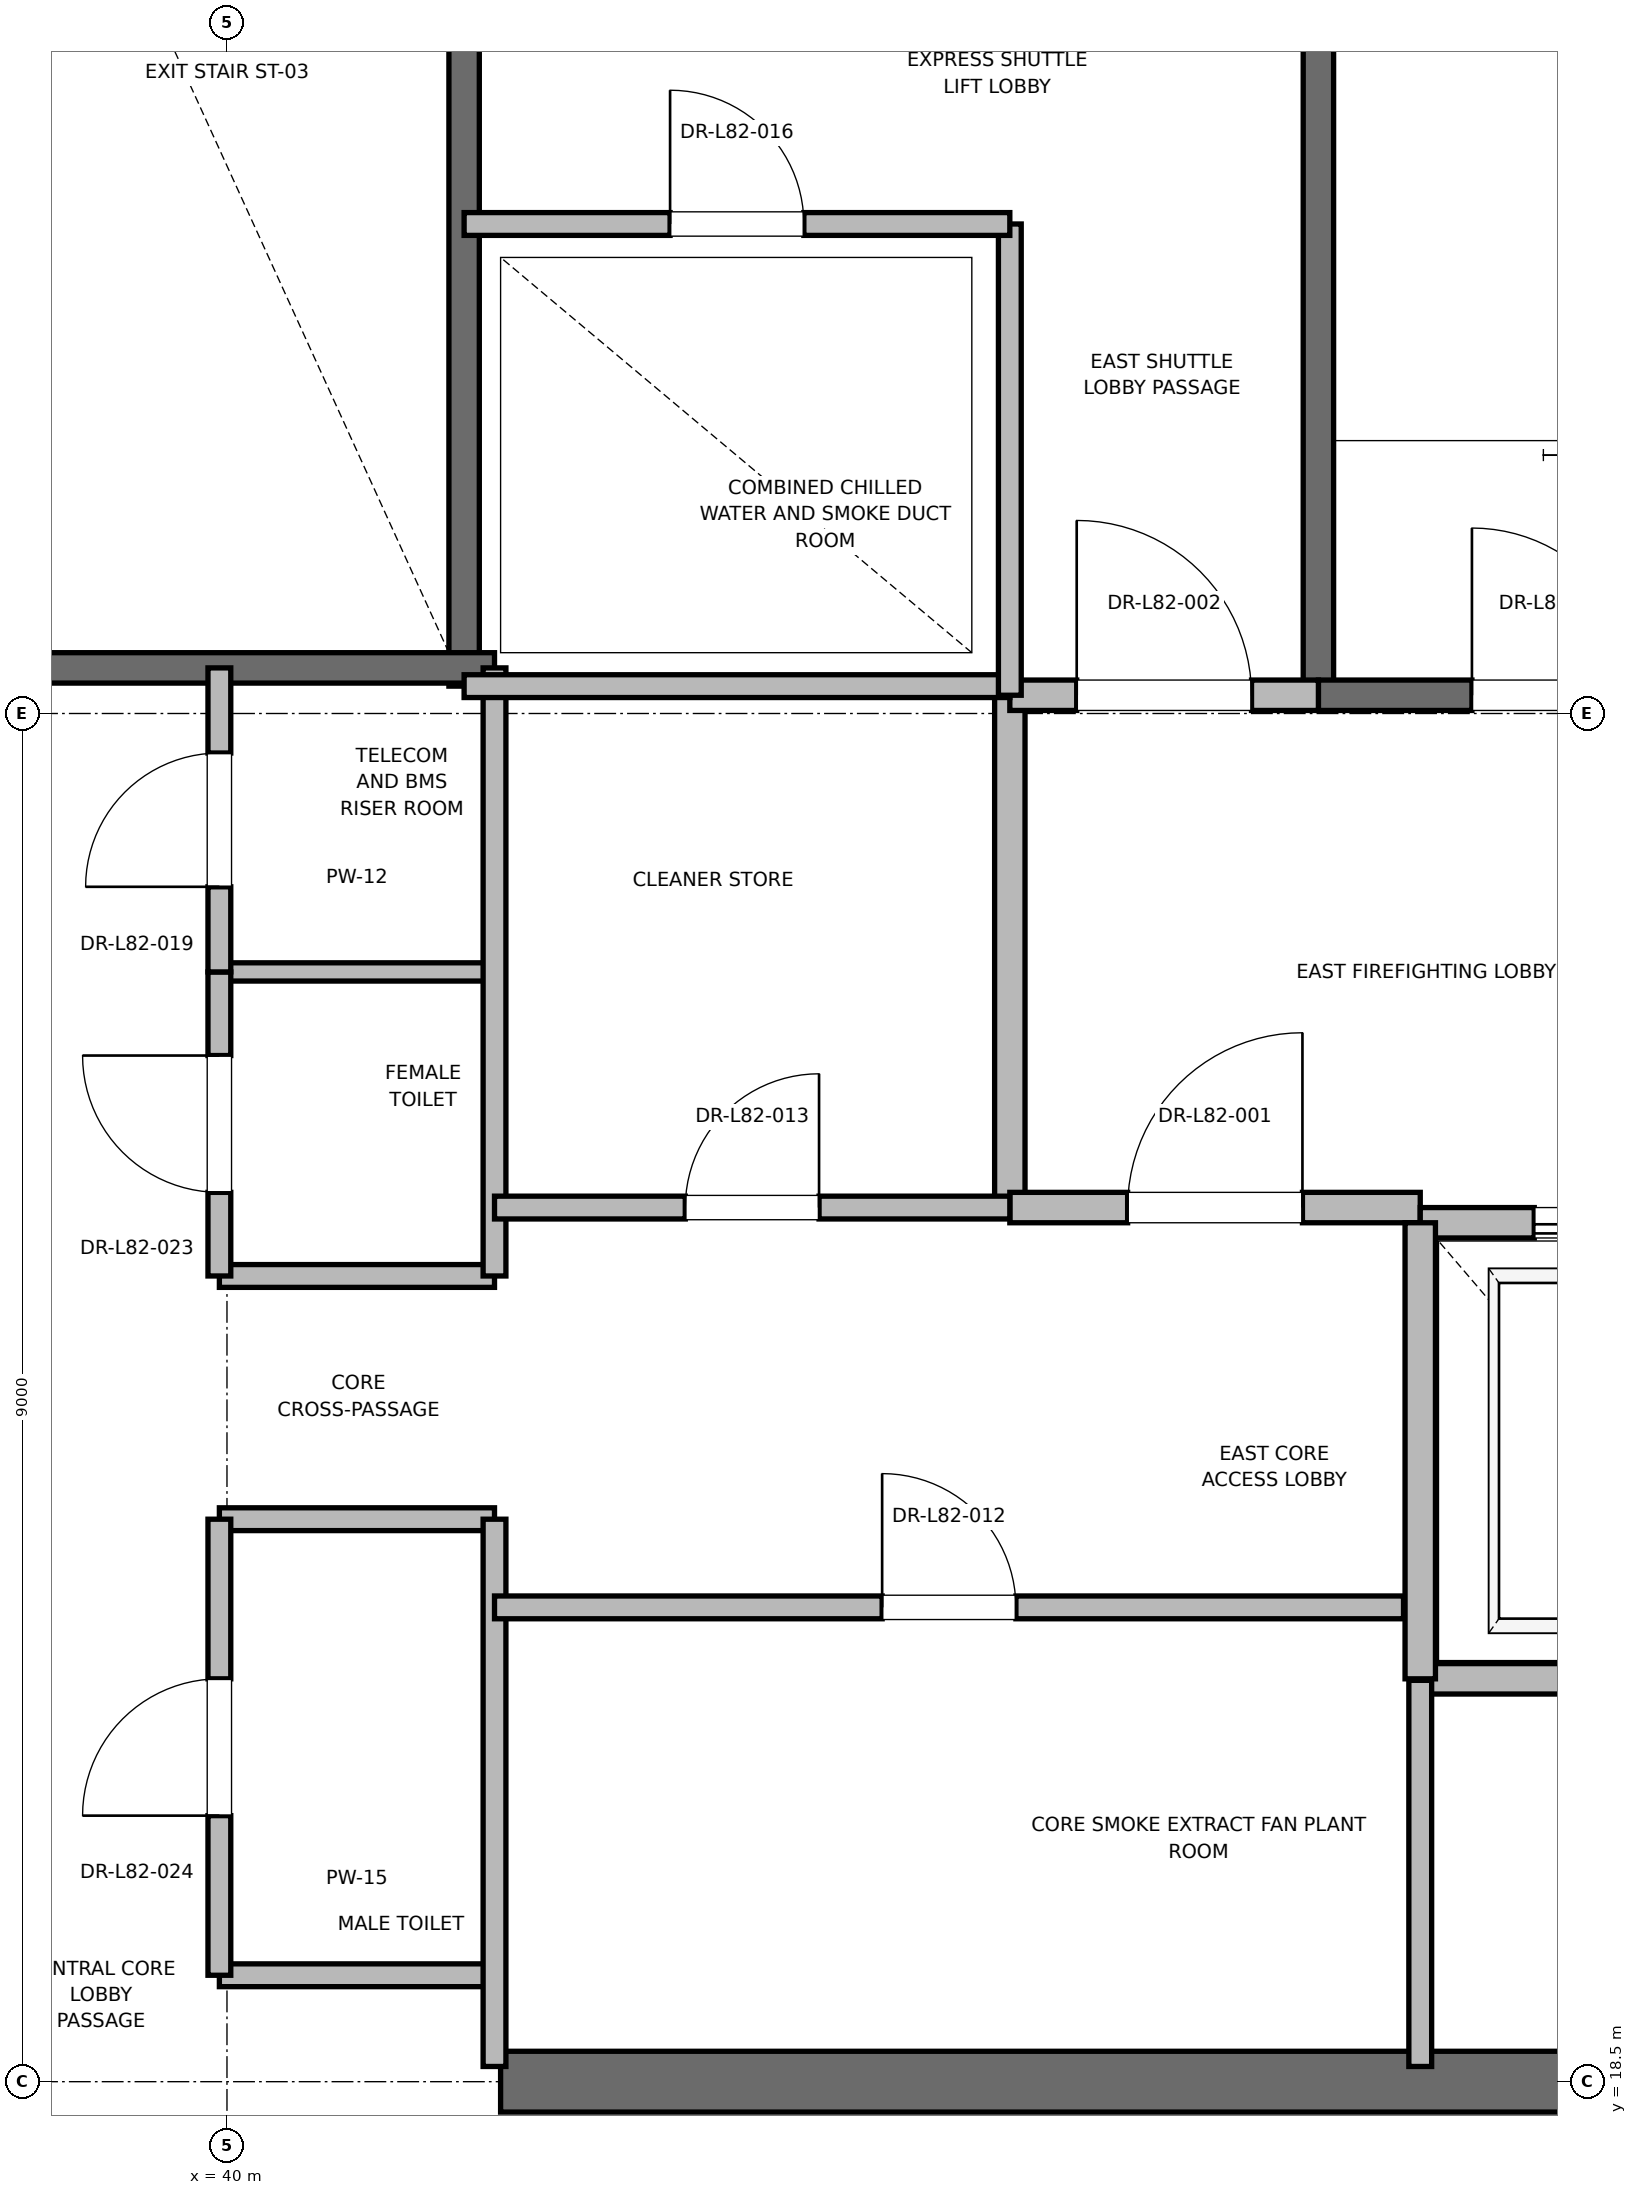
"""IFC4 building model, lengths in metres.
Left out: names, types, materials, properties, quantities, classifications, styles, units other than length and angle.
Written with IfcOpenShell. Run it as: python <this file> out.ifc"""

import sys

from ifc_helpers import new_model, si_unit, direction, frame, frame_2d, origin, place, context, subcontext, project, spatial, rectangle, extrude, element, fill, save


model = new_model("IFC4")
c1 = context("Model", 3, precision=1e-05, world=origin(), true_north=direction((0.0, 1.0)))
c2 = subcontext(c1, "Body", "Model", "MODEL_VIEW")
j1 = project(units=[si_unit("LENGTHUNIT", "METRE"), si_unit("PLANEANGLEUNIT", "RADIAN")], contexts=[c1])
p1 = place(None, origin())
s1 = spatial("IfcSite", under=j1, at=p1, CompositionType="ELEMENT")
p2 = place(p1, origin())
s2 = spatial("IfcBuilding", under=s1, at=p2, CompositionType="ELEMENT")
p3 = place(p2, frame((0.0, 0.0, 354.3)))
s3 = spatial("IfcBuildingStorey", under=s2, at=p3, CompositionType="ELEMENT", Elevation=354.3)
p4 = place(p3, frame((41.8, 18.5, 0.0), z_axis=(0.0, 0.0, 1.0), x_axis=(1.0, 0.0, 0.0)))
e1 = element("IfcWall", 1, at=p4, inside=s3, PredefinedType="SHEAR", context=c2, shape_type="SweptSolid", body=[
    extrude(rectangle(XDim=9.2, YDim=0.4, at=frame_2d((4.6, 0.0))), origin(), (0.0, 0.0, 1.0), 5.24),
])
p5 = place(p3, frame((47.18, 27.62, 0.0), z_axis=(0.0, 0.0, 1.0), x_axis=(0.0, 1.0, 0.0)))
e2 = element("IfcWall", 2, at=p5, inside=s3, PredefinedType="SOLIDWALL", context=c2, shape_type="SweptSolid", body=[
    extrude(rectangle(XDim=8.18, YDim=0.2, at=frame_2d((4.09, 0.0))), origin(), (0.0, 0.0, 1.0), 5.24),
])
p6 = place(p3, frame((47.18, 27.62, 0.0), z_axis=(0.0, 0.0, 1.0), x_axis=(1.0, 0.0, 0.0)))
e3 = element("IfcWall", 3, at=p6, inside=s3, PredefinedType="SOLIDWALL", context=c2, shape_type="SweptSolid", body=[
    extrude(rectangle(XDim=3.12, YDim=0.2, at=frame_2d((1.56, 0.0))), origin(), (0.0, 0.0, 1.0), 5.24),
])
p7 = place(p6, frame((1.01, 0.0, 0.0)))
e4 = element("IfcOpeningElement", 4, at=p7, cuts=e3, PredefinedType="OPENING", context=c2, shape_type="SweptSolid", body=[
    extrude(rectangle(XDim=1.1, YDim=2.15, at=frame_2d((0.55, 1.075))), frame((0.0, 0.1, 0.0), z_axis=(0.0, -1.0, 0.0), x_axis=(1.0, 0.0, 0.0)), (0.0, 0.0, 1.0), 0.2),
])
p8 = place(p3, frame((41.56, 27.68, 0.0), z_axis=(0.0, 0.0, 1.0), x_axis=(0.0, 1.0, 0.0)))
e5 = element("IfcWall", 5, at=p8, inside=s3, PredefinedType="SOLIDWALL", context=c2, shape_type="SweptSolid", body=[
    extrude(rectangle(XDim=8.57, YDim=0.2, at=frame_2d((4.285, 0.0))), origin(), (0.0, 0.0, 1.0), 5.24),
])
p9 = place(p3, frame((38.44, 27.8, 0.0), z_axis=(0.0, 0.0, 1.0), x_axis=(1.0, 0.0, 0.0)))
e6 = element("IfcWall", 6, at=p9, inside=s3, PredefinedType="SOLIDWALL", context=c2, shape_type="SweptSolid", body=[
    extrude(rectangle(XDim=3.32, YDim=0.2, at=frame_2d((1.66, 0.0))), origin(), (0.0, 0.0, 1.0), 5.24),
])
p10 = place(p3, frame((45.15, 24.25, 0.0), z_axis=(0.0, 0.0, 1.0), x_axis=(0.0, 1.0, 0.0)))
e7 = element("IfcWall", 7, at=p10, inside=s3, PredefinedType="PARTITIONING", context=c2, shape_type="SweptSolid", body=[
    extrude(rectangle(XDim=3.37, YDim=0.2, at=frame_2d((1.685, 0.0))), origin(), (0.0, 0.0, 1.0), 5.24),
])
p11 = place(p3, frame((45.15, 24.25, 0.0), z_axis=(0.0, 0.0, 1.0), x_axis=(1.0, 0.0, 0.0)))
e8 = element("IfcWall", 8, at=p11, inside=s3, PredefinedType="PARTITIONING", context=c2, shape_type="SweptSolid", body=[
    extrude(rectangle(XDim=2.7, YDim=0.2, at=frame_2d((1.35, 0.0))), origin(), (0.0, 0.0, 1.0), 5.24),
])
p12 = place(p11, frame((0.775, 0.0, 0.0)))
e9 = element("IfcOpeningElement", 9, at=p12, cuts=e8, PredefinedType="OPENING", context=c2, shape_type="SweptSolid", body=[
    extrude(rectangle(XDim=1.15, YDim=2.2, at=frame_2d((0.575, 1.1))), frame((0.0, 0.1, 0.0), z_axis=(0.0, -1.0, 0.0), x_axis=(1.0, 0.0, 0.0)), (0.0, 0.0, 1.0), 0.2),
])
p13 = place(p3, frame((45.15, 27.62, 0.0), z_axis=(0.0, 0.0, 1.0), x_axis=(1.0, 0.0, 0.0)))
e10 = element("IfcWall", 10, at=p13, inside=s3, PredefinedType="PARTITIONING", context=c2, shape_type="SweptSolid", body=[
    extrude(rectangle(XDim=2.03, YDim=0.2, at=frame_2d((1.015, 0.0))), origin(), (0.0, 0.0, 1.0), 5.24),
])
p14 = place(p13, frame((0.44, 0.0, 0.0)))
e11 = element("IfcOpeningElement", 11, at=p14, cuts=e10, PredefinedType="OPENING", context=c2, shape_type="SweptSolid", body=[
    extrude(rectangle(XDim=1.15, YDim=2.2, at=frame_2d((0.575, 1.1))), frame((0.0, 0.1, 0.0), z_axis=(0.0, -1.0, 0.0), x_axis=(1.0, 0.0, 0.0)), (0.0, 0.0, 1.0), 0.2),
])
p15 = place(p3, frame((47.85, 21.15, 0.0), z_axis=(0.0, 0.0, 1.0), x_axis=(1.0, 0.0, 0.0)))
e12 = element("IfcWall", 12, at=p15, inside=s3, PredefinedType="SOLIDWALL", context=c2, shape_type="SweptSolid", body=[
    extrude(rectangle(XDim=2.6, YDim=0.2, at=frame_2d((1.3, 0.0))), origin(), (0.0, 0.0, 1.0), 5.24),
])
p16 = place(p3, frame((50.45, 24.15, 0.0), z_axis=(0.0, 0.0, 1.0), x_axis=(-1.0, 0.0, 0.0)))
e13 = element("IfcWall", 13, at=p16, inside=s3, PredefinedType="SOLIDWALL", context=c2, shape_type="SweptSolid", body=[
    extrude(rectangle(XDim=2.6, YDim=0.2, at=frame_2d((1.3, 0.0))), origin(), (0.0, 0.0, 1.0), 4.32),
])
p17 = place(p16, frame((0.75, 0.0, 0.0)))
e14 = element("IfcOpeningElement", 14, at=p17, cuts=e13, PredefinedType="OPENING", context=c2, shape_type="SweptSolid", body=[
    extrude(rectangle(XDim=1.1, YDim=2.2, at=frame_2d((0.55, 1.1))), frame((0.0, 0.1, 0.0), z_axis=(0.0, -1.0, 0.0), x_axis=(1.0, 0.0, 0.0)), (0.0, 0.0, 1.0), 0.2),
])
p18 = place(p3, frame((47.85, 24.15, 0.0), z_axis=(0.0, 0.0, 1.0), x_axis=(0.0, -1.0, 0.0)))
e15 = element("IfcWall", 15, at=p18, inside=s3, PredefinedType="SOLIDWALL", context=c2, shape_type="SweptSolid", body=[
    extrude(rectangle(XDim=3.0, YDim=0.2, at=frame_2d((1.5, 0.0))), origin(), (0.0, 0.0, 1.0), 5.24),
])
for number, where, z_axis, x_axis in (
    (16, (39.95, 19.2, 0.0), (0.0, 0.0, 1.0), (1.0, 0.0, 0.0)),
    (17, (39.95, 22.2, 0.0), (0.0, 0.0, 1.0), (1.0, 0.0, 0.0)),
    (18, (39.95, 23.8, 0.0), (0.0, 0.0, 1.0), (1.0, 0.0, 0.0)),
):
    element("IfcWall", number, at=place(p3, frame(where, z_axis=z_axis, x_axis=x_axis)), inside=s3, PredefinedType="PARTITIONING", context=c2, shape_type="SweptSolid", body=[
        extrude(rectangle(XDim=1.81, YDim=0.15, at=frame_2d((0.905, 0.0))), origin(), (0.0, 0.0, 1.0), 2.85),
    ])
p19 = place(p3, frame((39.95, 25.8, 0.0), z_axis=(0.0, 0.0, 1.0), x_axis=(1.0, 0.0, 0.0)))
e19 = element("IfcWall", 19, at=p19, inside=s3, PredefinedType="PARTITIONING", context=c2, shape_type="SweptSolid", body=[
    extrude(rectangle(XDim=1.81, YDim=0.12, at=frame_2d((0.905, 0.0))), origin(), (0.0, 0.0, 1.0), 2.85),
])
p20 = place(p3, frame((41.76, 18.6, 0.0), z_axis=(0.0, 0.0, 1.0), x_axis=(0.0, 1.0, 0.0)))
e20 = element("IfcWall", 20, at=p20, inside=s3, PredefinedType="PARTITIONING", context=c2, shape_type="SweptSolid", body=[
    extrude(rectangle(XDim=3.6, YDim=0.15, at=frame_2d((1.8, 0.0))), origin(), (0.0, 0.0, 1.0), 2.85),
])
p21 = place(p3, frame((41.76, 23.8, 0.0), z_axis=(0.0, 0.0, 1.0), x_axis=(0.0, 1.0, 0.0)))
e21 = element("IfcWall", 21, at=p21, inside=s3, PredefinedType="PARTITIONING", context=c2, shape_type="SweptSolid", body=[
    extrude(rectangle(XDim=4.0, YDim=0.15, at=frame_2d((2.0, 0.0))), origin(), (0.0, 0.0, 1.0), 2.85),
])
p22 = place(p3, frame((39.95, 19.2, 0.0), z_axis=(0.0, 0.0, 1.0), x_axis=(0.0, 1.0, 0.0)))
e22 = element("IfcWall", 22, at=p22, inside=s3, PredefinedType="PARTITIONING", context=c2, shape_type="SweptSolid", body=[
    extrude(rectangle(XDim=3.0, YDim=0.15, at=frame_2d((1.5, 0.0))), origin(), (0.0, 0.0, 1.0), 2.85),
])
p23 = place(p22, frame((1.05, 0.0, 0.0)))
e23 = element("IfcOpeningElement", 23, at=p23, cuts=e22, PredefinedType="OPENING", context=c2, shape_type="SweptSolid", body=[
    extrude(rectangle(XDim=0.9, YDim=2.1, at=frame_2d((0.45, 1.05))), frame((0.0, 0.075, 0.0), z_axis=(0.0, -1.0, 0.0), x_axis=(1.0, 0.0, 0.0)), (0.0, 0.0, 1.0), 0.15),
])
p24 = place(p3, frame((39.95, 23.8, 0.0), z_axis=(0.0, 0.0, 1.0), x_axis=(0.0, 1.0, 0.0)))
e24 = element("IfcWall", 24, at=p24, inside=s3, PredefinedType="PARTITIONING", context=c2, shape_type="SweptSolid", body=[
    extrude(rectangle(XDim=2.0, YDim=0.15, at=frame_2d((1.0, 0.0))), origin(), (0.0, 0.0, 1.0), 2.85),
])
p25 = place(p24, frame((0.55, 0.0, 0.0)))
e25 = element("IfcOpeningElement", 25, at=p25, cuts=e24, PredefinedType="OPENING", context=c2, shape_type="SweptSolid", body=[
    extrude(rectangle(XDim=0.9, YDim=2.1, at=frame_2d((0.45, 1.05))), frame((0.0, 0.075, 0.0), z_axis=(0.0, -1.0, 0.0), x_axis=(1.0, 0.0, 0.0)), (0.0, 0.0, 1.0), 0.15),
])
p26 = place(p3, frame((39.95, 25.8, 0.0), z_axis=(0.0, 0.0, 1.0), x_axis=(0.0, 1.0, 0.0)))
e26 = element("IfcWall", 26, at=p26, inside=s3, PredefinedType="PARTITIONING", context=c2, shape_type="SweptSolid", body=[
    extrude(rectangle(XDim=2.0, YDim=0.15, at=frame_2d((1.0, 0.0))), origin(), (0.0, 0.0, 1.0), 2.85),
])
p27 = place(p26, frame((0.56, 0.0, 0.0)))
e27 = element("IfcOpeningElement", 27, at=p27, cuts=e26, PredefinedType="OPENING", context=c2, shape_type="SweptSolid", body=[
    extrude(rectangle(XDim=0.88, YDim=2.1, at=frame_2d((0.44, 1.05))), frame((0.0, 0.075, 0.0), z_axis=(0.0, -1.0, 0.0), x_axis=(1.0, 0.0, 0.0)), (0.0, 0.0, 1.0), 0.15),
])
p28 = place(p3, frame((41.56, 27.68, 0.0), z_axis=(0.0, 0.0, 1.0), x_axis=(1.0, 0.0, 0.0)))
e28 = element("IfcWall", 28, at=p28, inside=s3, PredefinedType="PARTITIONING", context=c2, shape_type="SweptSolid", body=[
    extrude(rectangle(XDim=3.59, YDim=0.15, at=frame_2d((1.795, 0.0))), origin(), (0.0, 0.0, 1.0), 2.85),
])
p29 = place(p3, frame((47.85, 18.6, 0.0), z_axis=(0.0, 0.0, 1.0), x_axis=(0.0, 1.0, 0.0)))
e29 = element("IfcWall", 29, at=p29, inside=s3, PredefinedType="PARTITIONING", context=c2, shape_type="SweptSolid", body=[
    extrude(rectangle(XDim=2.54, YDim=0.15, at=frame_2d((1.27, 0.0))), origin(), (0.0, 0.0, 1.0), 2.85),
])
p30 = place(p3, frame((41.76, 21.62, 0.0), z_axis=(0.0, 0.0, 1.0), x_axis=(1.0, 0.0, 0.0)))
e30 = element("IfcWall", 30, at=p30, inside=s3, PredefinedType="PARTITIONING", context=c2, shape_type="SweptSolid", body=[
    extrude(rectangle(XDim=5.98, YDim=0.15, at=frame_2d((2.99, 0.0))), origin(), (0.0, 0.0, 1.0), 2.85),
])
p31 = place(p30, frame((2.55, 0.0, 0.0)))
e31 = element("IfcOpeningElement", 31, at=p31, cuts=e30, PredefinedType="OPENING", context=c2, shape_type="SweptSolid", body=[
    extrude(rectangle(XDim=0.88, YDim=2.1, at=frame_2d((0.44, 1.05))), frame((0.0, 0.075, 0.0), z_axis=(0.0, -1.0, 0.0), x_axis=(1.0, 0.0, 0.0)), (0.0, 0.0, 1.0), 0.15),
])
p32 = place(p3, frame((41.76, 24.25, 0.0), z_axis=(0.0, 0.0, 1.0), x_axis=(1.0, 0.0, 0.0)))
e32 = element("IfcWall", 32, at=p32, inside=s3, PredefinedType="PARTITIONING", context=c2, shape_type="SweptSolid", body=[
    extrude(rectangle(XDim=3.39, YDim=0.15, at=frame_2d((1.695, 0.0))), origin(), (0.0, 0.0, 1.0), 2.85),
])
p33 = place(p32, frame((1.255, 0.0, 0.0)))
e33 = element("IfcOpeningElement", 33, at=p33, cuts=e32, PredefinedType="OPENING", context=c2, shape_type="SweptSolid", body=[
    extrude(rectangle(XDim=0.88, YDim=2.1, at=frame_2d((0.44, 1.05))), frame((0.0, 0.075, 0.0), z_axis=(0.0, -1.0, 0.0), x_axis=(1.0, 0.0, 0.0)), (0.0, 0.0, 1.0), 0.15),
])
p34 = place(p3, frame((45.15, 27.62, 0.0), z_axis=(0.0, 0.0, 1.0), x_axis=(0.0, 1.0, 0.0)))
e34 = element("IfcWall", 34, at=p34, inside=s3, PredefinedType="PARTITIONING", context=c2, shape_type="SweptSolid", body=[
    extrude(rectangle(XDim=3.1, YDim=0.15, at=frame_2d((1.55, 0.0))), origin(), (0.0, 0.0, 1.0), 2.85),
])
p35 = place(p3, frame((41.56, 30.72, 0.0), z_axis=(0.0, 0.0, 1.0), x_axis=(1.0, 0.0, 0.0)))
e35 = element("IfcWall", 35, at=p35, inside=s3, PredefinedType="PARTITIONING", context=c2, shape_type="SweptSolid", body=[
    extrude(rectangle(XDim=3.59, YDim=0.15, at=frame_2d((1.795, 0.0))), origin(), (0.0, 0.0, 1.0), 2.85),
])
p36 = place(p35, frame((1.355, 0.0, 0.0)))
e36 = element("IfcOpeningElement", 36, at=p36, cuts=e35, PredefinedType="OPENING", context=c2, shape_type="SweptSolid", body=[
    extrude(rectangle(XDim=0.88, YDim=2.1, at=frame_2d((0.44, 1.05))), frame((0.0, 0.075, 0.0), z_axis=(0.0, -1.0, 0.0), x_axis=(1.0, 0.0, 0.0)), (0.0, 0.0, 1.0), 0.15),
])
p37 = place(p7, origin())
e37 = element("IfcDoor", 37, at=p37, inside=s3, OperationType="SINGLE_SWING_LEFT", PredefinedType="DOOR", context=c2, shape_type="SweptSolid", body=[
    extrude(rectangle(XDim=1.1, YDim=2.15, at=frame_2d((0.55, 1.075))), frame((0.0, 0.025, 0.0), z_axis=(0.0, -1.0, 0.0), x_axis=(1.0, 0.0, 0.0)), (0.0, 0.0, 1.0), 0.05),
])
fill(e4, e37)
p38 = place(p12, origin())
e38 = element("IfcDoor", 38, at=p38, inside=s3, OperationType="SINGLE_SWING_RIGHT", PredefinedType="DOOR", context=c2, shape_type="SweptSolid", body=[
    extrude(rectangle(XDim=1.15, YDim=2.2, at=frame_2d((0.575, 1.1))), frame((0.0, 0.025, 0.0), z_axis=(0.0, -1.0, 0.0), x_axis=(1.0, 0.0, 0.0)), (0.0, 0.0, 1.0), 0.05),
])
fill(e9, e38)
p39 = place(p14, origin())
e39 = element("IfcDoor", 39, at=p39, inside=s3, OperationType="SINGLE_SWING_LEFT", PredefinedType="DOOR", context=c2, shape_type="SweptSolid", body=[
    extrude(rectangle(XDim=1.15, YDim=2.2, at=frame_2d((0.575, 1.1))), frame((0.0, 0.025, 0.0), z_axis=(0.0, -1.0, 0.0), x_axis=(1.0, 0.0, 0.0)), (0.0, 0.0, 1.0), 0.05),
])
fill(e11, e39)
p40 = place(p17, origin())
e40 = element("IfcDoor", 40, at=p40, inside=s3, OperationType="SLIDING_TO_RIGHT", PredefinedType="DOOR", context=c2, shape_type="SweptSolid", body=[
    extrude(rectangle(XDim=1.1, YDim=2.2, at=frame_2d((0.55, 1.1))), frame((0.0, 0.025, 0.0), z_axis=(0.0, -1.0, 0.0), x_axis=(1.0, 0.0, 0.0)), (0.0, 0.0, 1.0), 0.05),
])
fill(e14, e40)
p41 = place(p23, origin())
e41 = element("IfcDoor", 41, at=p41, inside=s3, OperationType="SINGLE_SWING_LEFT", PredefinedType="DOOR", context=c2, shape_type="SweptSolid", body=[
    extrude(rectangle(XDim=0.9, YDim=2.1, at=frame_2d((0.45, 1.05))), frame((0.0, 0.025, 0.0), z_axis=(0.0, -1.0, 0.0), x_axis=(1.0, 0.0, 0.0)), (0.0, 0.0, 1.0), 0.05),
])
fill(e23, e41)
p42 = place(p25, origin())
e42 = element("IfcDoor", 42, at=p42, inside=s3, OperationType="SINGLE_SWING_RIGHT", PredefinedType="DOOR", context=c2, shape_type="SweptSolid", body=[
    extrude(rectangle(XDim=0.9, YDim=2.1, at=frame_2d((0.45, 1.05))), frame((0.0, 0.025, 0.0), z_axis=(0.0, -1.0, 0.0), x_axis=(1.0, 0.0, 0.0)), (0.0, 0.0, 1.0), 0.05),
])
fill(e25, e42)
p43 = place(p27, origin())
e43 = element("IfcDoor", 43, at=p43, inside=s3, OperationType="SINGLE_SWING_LEFT", PredefinedType="DOOR", context=c2, shape_type="SweptSolid", body=[
    extrude(rectangle(XDim=0.88, YDim=2.1, at=frame_2d((0.44, 1.05))), frame((0.0, 0.025, 0.0), z_axis=(0.0, -1.0, 0.0), x_axis=(1.0, 0.0, 0.0)), (0.0, 0.0, 1.0), 0.05),
])
fill(e27, e43)
p44 = place(p31, origin())
e44 = element("IfcDoor", 44, at=p44, inside=s3, OperationType="SINGLE_SWING_LEFT", PredefinedType="DOOR", context=c2, shape_type="SweptSolid", body=[
    extrude(rectangle(XDim=0.88, YDim=2.1, at=frame_2d((0.44, 1.05))), frame((0.0, 0.025, 0.0), z_axis=(0.0, -1.0, 0.0), x_axis=(1.0, 0.0, 0.0)), (0.0, 0.0, 1.0), 0.05),
])
fill(e31, e44)
p45 = place(p33, origin())
e45 = element("IfcDoor", 45, at=p45, inside=s3, OperationType="SINGLE_SWING_RIGHT", PredefinedType="DOOR", context=c2, shape_type="SweptSolid", body=[
    extrude(rectangle(XDim=0.88, YDim=2.1, at=frame_2d((0.44, 1.05))), frame((0.0, 0.025, 0.0), z_axis=(0.0, -1.0, 0.0), x_axis=(1.0, 0.0, 0.0)), (0.0, 0.0, 1.0), 0.05),
])
fill(e33, e45)
p46 = place(p36, origin())
e46 = element("IfcDoor", 46, at=p46, inside=s3, OperationType="SINGLE_SWING_LEFT", PredefinedType="DOOR", context=c2, shape_type="SweptSolid", body=[
    extrude(rectangle(XDim=0.88, YDim=2.1, at=frame_2d((0.44, 1.05))), frame((0.0, 0.025, 0.0), z_axis=(0.0, -1.0, 0.0), x_axis=(1.0, 0.0, 0.0)), (0.0, 0.0, 1.0), 0.05),
])
fill(e36, e46)
save(model, sys.argv[1])
